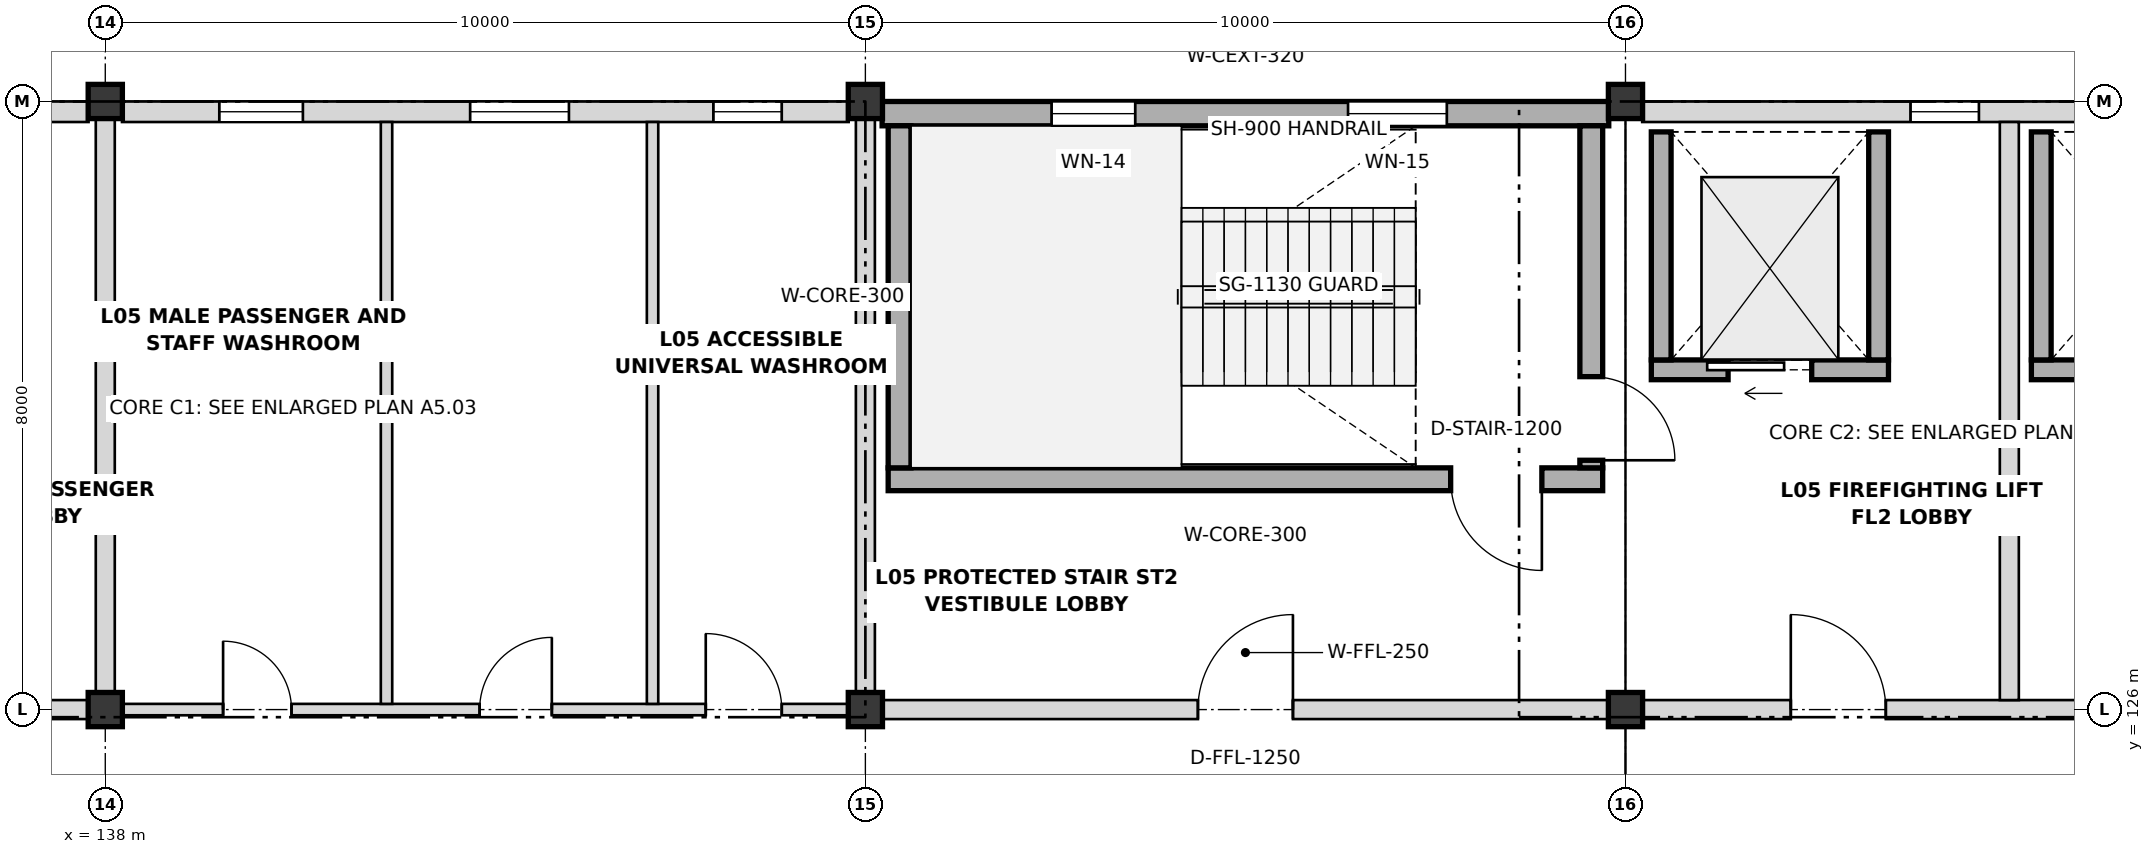
"""IFC4 building model, lengths in metres.
Left out: names, types, materials, properties, quantities, classifications, styles, units other than length and angle.
Written with IfcOpenShell. Run it as: python <this file> out.ifc"""

import sys

from ifc_helpers import new_model, si_unit, direction, frame, frame_2d, origin, origin_2d, place, context, subcontext, project, spatial, rectangle, extrude, element, fill, save


model = new_model("IFC4")
c1 = context("Model", 3, precision=1e-05, world=origin(), true_north=direction((0.0, 1.0)))
c2 = subcontext(c1, "Body", "Model", "MODEL_VIEW")
j1 = project(units=[si_unit("LENGTHUNIT", "METRE"), si_unit("PLANEANGLEUNIT", "RADIAN")], contexts=[c1])
p1 = place(None, origin())
s1 = spatial("IfcSite", under=j1, at=p1, CompositionType="ELEMENT")
p2 = place(p1, origin())
s2 = spatial("IfcBuilding", under=s1, at=p2, CompositionType="ELEMENT")
p3 = place(p2, frame((0.0, 0.0, 22.8)))
s3 = spatial("IfcBuildingStorey", under=s2, at=p3, CompositionType="ELEMENT", Elevation=22.8)
for number, where, z_axis, x_axis in (
    (1, (138.0, 126.0, 0.0), (0.0, 0.0, 1.0), (1.0, 0.0, 0.0)),
    (2, (138.0, 134.0, 0.0), (0.0, 0.0, 1.0), (1.0, 0.0, 0.0)),
    (3, (148.0, 126.0, 0.0), (0.0, 0.0, 1.0), (1.0, 0.0, 0.0)),
    (4, (148.0, 134.0, 0.0), (0.0, 0.0, 1.0), (1.0, 0.0, 0.0)),
    (5, (158.0, 126.0, 0.0), (0.0, 0.0, 1.0), (1.0, 0.0, 0.0)),
    (6, (158.0, 134.0, 0.0), (0.0, 0.0, 1.0), (1.0, 0.0, 0.0)),
):
    element("IfcColumn", number, at=place(p3, frame(where, z_axis=z_axis, x_axis=x_axis)), inside=s3, PredefinedType="COLUMN", context=c2, shape_type="SweptSolid", body=[
        extrude(rectangle(XDim=0.45, YDim=0.45, at=origin_2d()), origin(), (0.0, 0.0, 1.0), 4.2),
    ])
p4 = place(p3, frame((128.22, 133.865, 0.0), z_axis=(0.0, 0.0, 1.0), x_axis=(1.0, 0.0, 0.0)))
e7 = element("IfcWall", 7, at=p4, inside=s3, PredefinedType="SOLIDWALL", context=c2, shape_type="SweptSolid", body=[
    extrude(rectangle(XDim=9.56, YDim=0.27, at=frame_2d((4.78, 0.0))), origin(), (0.0, 0.0, 1.0), 3.188),
])
p5 = place(p4, frame((3.53, 0.0, 1.05)))
e8 = element("IfcOpeningElement", 8, at=p5, cuts=e7, PredefinedType="OPENING", context=c2, shape_type="SweptSolid", body=[
    extrude(rectangle(XDim=0.9, YDim=1.15, at=frame_2d((0.45, 0.575))), frame((0.0, 0.145, 0.0), z_axis=(0.0, -1.0, 0.0), x_axis=(1.0, 0.0, 0.0)), (0.0, 0.0, 1.0), 0.29),
])
p6 = place(p3, frame((138.22, 133.865, 0.0), z_axis=(0.0, 0.0, 1.0), x_axis=(1.0, 0.0, 0.0)))
e9 = element("IfcWall", 9, at=p6, inside=s3, PredefinedType="SOLIDWALL", context=c2, shape_type="SweptSolid", body=[
    extrude(rectangle(XDim=9.56, YDim=0.27, at=frame_2d((4.78, 0.0))), origin(), (0.0, 0.0, 1.0), 3.188),
])
p7 = place(p6, frame((1.28, 0.0, 1.25)))
e10 = element("IfcOpeningElement", 10, at=p7, cuts=e9, PredefinedType="OPENING", context=c2, shape_type="SweptSolid", body=[
    extrude(rectangle(XDim=1.1, YDim=1.15, at=frame_2d((0.55, 0.575))), frame((0.0, 0.145, 0.0), z_axis=(0.0, -1.0, 0.0), x_axis=(1.0, 0.0, 0.0)), (0.0, 0.0, 1.0), 0.29),
])
p8 = place(p6, frame((4.58, 0.0, 1.25)))
e11 = element("IfcOpeningElement", 11, at=p8, cuts=e9, PredefinedType="OPENING", context=c2, shape_type="SweptSolid", body=[
    extrude(rectangle(XDim=1.3, YDim=1.15, at=frame_2d((0.65, 0.575))), frame((0.0, 0.145, 0.0), z_axis=(0.0, -1.0, 0.0), x_axis=(1.0, 0.0, 0.0)), (0.0, 0.0, 1.0), 0.29),
])
p9 = place(p6, frame((7.78, 0.0, 1.25)))
e12 = element("IfcOpeningElement", 12, at=p9, cuts=e9, PredefinedType="OPENING", context=c2, shape_type="SweptSolid", body=[
    extrude(rectangle(XDim=0.9, YDim=1.4, at=frame_2d((0.45, 0.7))), frame((0.0, 0.145, 0.0), z_axis=(0.0, -1.0, 0.0), x_axis=(1.0, 0.0, 0.0)), (0.0, 0.0, 1.0), 0.29),
])
p10 = place(p3, frame((148.22, 133.84, 0.0), z_axis=(0.0, 0.0, 1.0), x_axis=(1.0, 0.0, 0.0)))
e13 = element("IfcWall", 13, at=p10, inside=s3, PredefinedType="SHEAR", context=c2, shape_type="SweptSolid", body=[
    extrude(rectangle(XDim=9.56, YDim=0.32, at=frame_2d((4.78, 0.0))), origin(), (0.0, 0.0, 1.0), 4.2),
])
p11 = place(p10, frame((2.23, 0.0, 1.05)))
e14 = element("IfcOpeningElement", 14, at=p11, cuts=e13, PredefinedType="OPENING", context=c2, shape_type="SweptSolid", body=[
    extrude(rectangle(XDim=1.1, YDim=1.4, at=frame_2d((0.55, 0.7))), frame((0.0, 0.17, 0.0), z_axis=(0.0, -1.0, 0.0), x_axis=(1.0, 0.0, 0.0)), (0.0, 0.0, 1.0), 0.34),
])
p12 = place(p10, frame((6.13, 0.0, 1.05)))
e15 = element("IfcOpeningElement", 15, at=p12, cuts=e13, PredefinedType="OPENING", context=c2, shape_type="SweptSolid", body=[
    extrude(rectangle(XDim=1.3, YDim=1.4, at=frame_2d((0.65, 0.7))), frame((0.0, 0.17, 0.0), z_axis=(0.0, -1.0, 0.0), x_axis=(1.0, 0.0, 0.0)), (0.0, 0.0, 1.0), 0.34),
])
p13 = place(p3, frame((158.22, 133.865, 0.0), z_axis=(0.0, 0.0, 1.0), x_axis=(1.0, 0.0, 0.0)))
e16 = element("IfcWall", 16, at=p13, inside=s3, PredefinedType="SOLIDWALL", context=c2, shape_type="SweptSolid", body=[
    extrude(rectangle(XDim=9.56, YDim=0.27, at=frame_2d((4.78, 0.0))), origin(), (0.0, 0.0, 1.0), 3.188),
])
p14 = place(p13, frame((3.53, 0.0, 1.05)))
e17 = element("IfcOpeningElement", 17, at=p14, cuts=e16, PredefinedType="OPENING", context=c2, shape_type="SweptSolid", body=[
    extrude(rectangle(XDim=0.9, YDim=1.15, at=frame_2d((0.45, 0.575))), frame((0.0, 0.145, 0.0), z_axis=(0.0, -1.0, 0.0), x_axis=(1.0, 0.0, 0.0)), (0.0, 0.0, 1.0), 0.29),
])
p15 = place(p3, frame((157.7, 129.03, 0.0), z_axis=(0.0, 0.0, 1.0), x_axis=(-1.0, 0.0, 0.0)))
e18 = element("IfcWall", 18, at=p15, inside=s3, PredefinedType="SHEAR", context=c2, shape_type="SweptSolid", body=[
    extrude(rectangle(XDim=9.4, YDim=0.3, at=frame_2d((4.7, 0.0))), origin(), (0.0, 0.0, 1.0), 4.2),
])
p16 = place(p15, frame((0.8, 0.0, 0.0)))
e19 = element("IfcOpeningElement", 19, at=p16, cuts=e18, PredefinedType="OPENING", context=c2, shape_type="SweptSolid", body=[
    extrude(rectangle(XDim=1.2, YDim=2.15, at=frame_2d((0.6, 1.075))), frame((0.0, 0.16, 0.0), z_axis=(0.0, -1.0, 0.0), x_axis=(1.0, 0.0, 0.0)), (0.0, 0.0, 1.0), 0.32),
])
p17 = place(p3, frame((157.55, 133.68, 0.0), z_axis=(0.0, 0.0, 1.0), x_axis=(0.0, -1.0, 0.0)))
e20 = element("IfcWall", 20, at=p17, inside=s3, PredefinedType="SHEAR", context=c2, shape_type="SweptSolid", body=[
    extrude(rectangle(XDim=4.5, YDim=0.3, at=frame_2d((2.25, 0.0))), origin(), (0.0, 0.0, 1.0), 4.2),
])
p18 = place(p17, frame((3.3, 0.0, 0.0)))
e21 = element("IfcOpeningElement", 21, at=p18, cuts=e20, PredefinedType="OPENING", context=c2, shape_type="SweptSolid", body=[
    extrude(rectangle(XDim=1.1, YDim=2.15, at=frame_2d((0.55, 1.075))), frame((0.0, 0.16, 0.0), z_axis=(0.0, -1.0, 0.0), x_axis=(1.0, 0.0, 0.0)), (0.0, 0.0, 1.0), 0.32),
])
p19 = place(p3, frame((148.45, 129.18, 0.0), z_axis=(0.0, 0.0, 1.0), x_axis=(0.0, 1.0, 0.0)))
e22 = element("IfcWall", 22, at=p19, inside=s3, PredefinedType="SHEAR", context=c2, shape_type="SweptSolid", body=[
    extrude(rectangle(XDim=4.5, YDim=0.3, at=frame_2d((2.25, 0.0))), origin(), (0.0, 0.0, 1.0), 4.2),
])
p20 = place(p3, frame((158.34, 130.47, 0.0), z_axis=(0.0, 0.0, 1.0), x_axis=(1.0, 0.0, 0.0)))
e23 = element("IfcWall", 23, at=p20, inside=s3, PredefinedType="SHEAR", context=c2, shape_type="SweptSolid", body=[
    extrude(rectangle(XDim=3.12, YDim=0.26, at=frame_2d((1.56, 0.0))), origin(), (0.0, 0.0, 1.0), 4.2),
])
p21 = place(p20, frame((1.01, 0.0, 0.0)))
e24 = element("IfcOpeningElement", 24, at=p21, cuts=e23, PredefinedType="OPENING", context=c2, shape_type="SweptSolid", body=[
    extrude(rectangle(XDim=1.1, YDim=2.1, at=frame_2d((0.55, 1.05))), frame((0.0, 0.14, 0.0), z_axis=(0.0, -1.0, 0.0), x_axis=(1.0, 0.0, 0.0)), (0.0, 0.0, 1.0), 0.28),
])
for number, where, z_axis, x_axis in (
    (25, (158.47, 130.6, 0.0), (0.0, 0.0, 1.0), (0.0, 1.0, 0.0)),
    (26, (161.33, 130.6, 0.0), (0.0, 0.0, 1.0), (0.0, 1.0, 0.0)),
):
    element("IfcWall", number, at=place(p3, frame(where, z_axis=z_axis, x_axis=x_axis)), inside=s3, PredefinedType="SHEAR", context=c2, shape_type="SweptSolid", body=[
        extrude(rectangle(XDim=3.0, YDim=0.26, at=frame_2d((1.5, 0.0))), origin(), (0.0, 0.0, 1.0), 4.2),
    ])
p22 = place(p3, frame((163.34, 130.47, 0.0), z_axis=(0.0, 0.0, 1.0), x_axis=(1.0, 0.0, 0.0)))
e27 = element("IfcWall", 27, at=p22, inside=s3, PredefinedType="SHEAR", context=c2, shape_type="SweptSolid", body=[
    extrude(rectangle(XDim=3.12, YDim=0.26, at=frame_2d((1.56, 0.0))), origin(), (0.0, 0.0, 1.0), 4.2),
])
p23 = place(p22, frame((1.01, 0.0, 0.0)))
e28 = element("IfcOpeningElement", 28, at=p23, cuts=e27, PredefinedType="OPENING", context=c2, shape_type="SweptSolid", body=[
    extrude(rectangle(XDim=1.1, YDim=2.15, at=frame_2d((0.55, 1.075))), frame((0.0, 0.14, 0.0), z_axis=(0.0, -1.0, 0.0), x_axis=(1.0, 0.0, 0.0)), (0.0, 0.0, 1.0), 0.28),
])
p24 = place(p3, frame((163.47, 130.6, 0.0), z_axis=(0.0, 0.0, 1.0), x_axis=(0.0, 1.0, 0.0)))
e29 = element("IfcWall", 29, at=p24, inside=s3, PredefinedType="SHEAR", context=c2, shape_type="SweptSolid", body=[
    extrude(rectangle(XDim=3.0, YDim=0.26, at=frame_2d((1.5, 0.0))), origin(), (0.0, 0.0, 1.0), 4.2),
])
p25 = place(p3, frame((128.23, 126.0, 0.0), z_axis=(0.0, 0.0, 1.0), x_axis=(1.0, 0.0, 0.0)))
e30 = element("IfcWall", 30, at=p25, inside=s3, PredefinedType="PARTITIONING", context=c2, shape_type="SweptSolid", body=[
    extrude(rectangle(XDim=9.54, YDim=0.25, at=frame_2d((4.77, 0.0))), origin(), (0.0, 0.0, 1.0), 3.188),
])
p26 = place(p25, frame((1.945, 0.0, 0.0)))
e31 = element("IfcOpeningElement", 31, at=p26, cuts=e30, PredefinedType="OPENING", context=c2, shape_type="SweptSolid", body=[
    extrude(rectangle(XDim=1.25, YDim=2.15, at=frame_2d((0.625, 1.075))), frame((0.0, 0.135, 0.0), z_axis=(0.0, -1.0, 0.0), x_axis=(1.0, 0.0, 0.0)), (0.0, 0.0, 1.0), 0.27),
])
p27 = place(p25, frame((6.42, 0.0, 0.0)))
e32 = element("IfcOpeningElement", 32, at=p27, cuts=e30, PredefinedType="OPENING", context=c2, shape_type="SweptSolid", body=[
    extrude(rectangle(XDim=1.1, YDim=2.15, at=frame_2d((0.55, 1.075))), frame((0.0, 0.135, 0.0), z_axis=(0.0, -1.0, 0.0), x_axis=(1.0, 0.0, 0.0)), (0.0, 0.0, 1.0), 0.27),
])
p28 = place(p3, frame((138.23, 126.0, 0.0), z_axis=(0.0, 0.0, 1.0), x_axis=(1.0, 0.0, 0.0)))
e33 = element("IfcWall", 33, at=p28, inside=s3, PredefinedType="PARTITIONING", context=c2, shape_type="SweptSolid", body=[
    extrude(rectangle(XDim=9.54, YDim=0.15, at=frame_2d((4.77, 0.0))), origin(), (0.0, 0.0, 1.0), 3.188),
])
p29 = place(p28, frame((1.32, 0.0, 0.0)))
e34 = element("IfcOpeningElement", 34, at=p29, cuts=e33, PredefinedType="OPENING", context=c2, shape_type="SweptSolid", body=[
    extrude(rectangle(XDim=0.9, YDim=2.05, at=frame_2d((0.45, 1.025))), frame((0.0, 0.085, 0.0), z_axis=(0.0, -1.0, 0.0), x_axis=(1.0, 0.0, 0.0)), (0.0, 0.0, 1.0), 0.17),
])
p30 = place(p28, frame((4.695, 0.0, 0.0)))
e35 = element("IfcOpeningElement", 35, at=p30, cuts=e33, PredefinedType="OPENING", context=c2, shape_type="SweptSolid", body=[
    extrude(rectangle(XDim=0.95, YDim=2.05, at=frame_2d((0.475, 1.025))), frame((0.0, 0.085, 0.0), z_axis=(0.0, -1.0, 0.0), x_axis=(1.0, 0.0, 0.0)), (0.0, 0.0, 1.0), 0.17),
])
p31 = place(p28, frame((7.67, 0.0, 0.0)))
e36 = element("IfcOpeningElement", 36, at=p31, cuts=e33, PredefinedType="OPENING", context=c2, shape_type="SweptSolid", body=[
    extrude(rectangle(XDim=1.0, YDim=2.05, at=frame_2d((0.5, 1.025))), frame((0.0, 0.085, 0.0), z_axis=(0.0, -1.0, 0.0), x_axis=(1.0, 0.0, 0.0)), (0.0, 0.0, 1.0), 0.17),
])
p32 = place(p3, frame((148.23, 126.0, 0.0), z_axis=(0.0, 0.0, 1.0), x_axis=(1.0, 0.0, 0.0)))
e37 = element("IfcWall", 37, at=p32, inside=s3, PredefinedType="PARTITIONING", context=c2, shape_type="SweptSolid", body=[
    extrude(rectangle(XDim=9.54, YDim=0.25, at=frame_2d((4.77, 0.0))), origin(), (0.0, 0.0, 1.0), 3.188),
])
p33 = place(p32, frame((4.145, 0.0, 0.0)))
e38 = element("IfcOpeningElement", 38, at=p33, cuts=e37, PredefinedType="OPENING", context=c2, shape_type="SweptSolid", body=[
    extrude(rectangle(XDim=1.25, YDim=2.15, at=frame_2d((0.625, 1.075))), frame((0.0, 0.135, 0.0), z_axis=(0.0, -1.0, 0.0), x_axis=(1.0, 0.0, 0.0)), (0.0, 0.0, 1.0), 0.27),
])
p34 = place(p3, frame((158.23, 126.0, 0.0), z_axis=(0.0, 0.0, 1.0), x_axis=(1.0, 0.0, 0.0)))
e39 = element("IfcWall", 39, at=p34, inside=s3, PredefinedType="PARTITIONING", context=c2, shape_type="SweptSolid", body=[
    extrude(rectangle(XDim=9.54, YDim=0.25, at=frame_2d((4.77, 0.0))), origin(), (0.0, 0.0, 1.0), 3.188),
])
p35 = place(p34, frame((1.945, 0.0, 0.0)))
e40 = element("IfcOpeningElement", 40, at=p35, cuts=e39, PredefinedType="OPENING", context=c2, shape_type="SweptSolid", body=[
    extrude(rectangle(XDim=1.25, YDim=2.15, at=frame_2d((0.625, 1.075))), frame((0.0, 0.135, 0.0), z_axis=(0.0, -1.0, 0.0), x_axis=(1.0, 0.0, 0.0)), (0.0, 0.0, 1.0), 0.27),
])
p36 = place(p34, frame((6.42, 0.0, 0.0)))
e41 = element("IfcOpeningElement", 41, at=p36, cuts=e39, PredefinedType="OPENING", context=c2, shape_type="SweptSolid", body=[
    extrude(rectangle(XDim=1.1, YDim=2.15, at=frame_2d((0.55, 1.075))), frame((0.0, 0.135, 0.0), z_axis=(0.0, -1.0, 0.0), x_axis=(1.0, 0.0, 0.0)), (0.0, 0.0, 1.0), 0.27),
])
p37 = place(p3, frame((163.05, 126.125, 0.0), z_axis=(0.0, 0.0, 1.0), x_axis=(0.0, 1.0, 0.0)))
e42 = element("IfcWall", 42, at=p37, inside=s3, PredefinedType="PARTITIONING", context=c2, shape_type="SweptSolid", body=[
    extrude(rectangle(XDim=7.605, YDim=0.25, at=frame_2d((3.802, 0.0))), origin(), (0.0, 0.0, 1.0), 3.188),
])
for number, where, z_axis, x_axis in (
    (43, (141.7, 126.075, 0.0), (0.0, 0.0, 1.0), (0.0, 1.0, 0.0)),
    (44, (145.2, 126.075, 0.0), (0.0, 0.0, 1.0), (0.0, 1.0, 0.0)),
):
    element("IfcWall", number, at=place(p3, frame(where, z_axis=z_axis, x_axis=x_axis)), inside=s3, PredefinedType="PARTITIONING", context=c2, shape_type="SweptSolid", body=[
        extrude(rectangle(XDim=7.655, YDim=0.15, at=frame_2d((3.828, 0.0))), origin(), (0.0, 0.0, 1.0), 3.188),
    ])
for number, where, z_axis, x_axis in (
    (45, (138.0, 126.23, 0.0), (0.0, 0.0, 1.0), (0.0, 1.0, 0.0)),
    (46, (148.0, 126.23, 0.0), (0.0, 0.0, 1.0), (0.0, 1.0, 0.0)),
):
    element("IfcWall", number, at=place(p3, frame(where, z_axis=z_axis, x_axis=x_axis)), inside=s3, PredefinedType="PARTITIONING", context=c2, shape_type="SweptSolid", body=[
        extrude(rectangle(XDim=7.54, YDim=0.25, at=frame_2d((3.77, 0.0))), origin(), (0.0, 0.0, 1.0), 3.188),
    ])
p38 = place(p7, origin())
e47 = element("IfcWindow", 47, at=p38, inside=s3, PartitioningType="SINGLE_PANEL", PredefinedType="WINDOW", context=c2, shape_type="SweptSolid", body=[
    extrude(rectangle(XDim=1.1, YDim=1.15, at=frame_2d((0.55, 0.575))), frame((0.0, 0.03, 0.0), z_axis=(0.0, -1.0, 0.0), x_axis=(1.0, 0.0, 0.0)), (0.0, 0.0, 1.0), 0.06),
])
fill(e10, e47)
p39 = place(p8, origin())
e48 = element("IfcWindow", 48, at=p39, inside=s3, PartitioningType="SINGLE_PANEL", PredefinedType="WINDOW", context=c2, shape_type="SweptSolid", body=[
    extrude(rectangle(XDim=1.3, YDim=1.15, at=frame_2d((0.65, 0.575))), frame((0.0, 0.03, 0.0), z_axis=(0.0, -1.0, 0.0), x_axis=(1.0, 0.0, 0.0)), (0.0, 0.0, 1.0), 0.06),
])
fill(e11, e48)
p40 = place(p9, origin())
e49 = element("IfcWindow", 49, at=p40, inside=s3, PartitioningType="SINGLE_PANEL", PredefinedType="WINDOW", context=c2, shape_type="SweptSolid", body=[
    extrude(rectangle(XDim=0.9, YDim=1.4, at=frame_2d((0.45, 0.7))), frame((0.0, 0.03, 0.0), z_axis=(0.0, -1.0, 0.0), x_axis=(1.0, 0.0, 0.0)), (0.0, 0.0, 1.0), 0.06),
])
fill(e12, e49)
p41 = place(p11, origin())
e50 = element("IfcWindow", 50, at=p41, inside=s3, PartitioningType="SINGLE_PANEL", PredefinedType="WINDOW", context=c2, shape_type="SweptSolid", body=[
    extrude(rectangle(XDim=1.1, YDim=1.4, at=frame_2d((0.55, 0.7))), frame((0.0, 0.03, 0.0), z_axis=(0.0, -1.0, 0.0), x_axis=(1.0, 0.0, 0.0)), (0.0, 0.0, 1.0), 0.06),
])
fill(e14, e50)
p42 = place(p12, origin())
e51 = element("IfcWindow", 51, at=p42, inside=s3, PartitioningType="SINGLE_PANEL", PredefinedType="WINDOW", context=c2, shape_type="SweptSolid", body=[
    extrude(rectangle(XDim=1.3, YDim=1.4, at=frame_2d((0.65, 0.7))), frame((0.0, 0.03, 0.0), z_axis=(0.0, -1.0, 0.0), x_axis=(1.0, 0.0, 0.0)), (0.0, 0.0, 1.0), 0.06),
])
fill(e15, e51)
p43 = place(p14, origin())
e52 = element("IfcWindow", 52, at=p43, inside=s3, PartitioningType="SINGLE_PANEL", PredefinedType="WINDOW", context=c2, shape_type="SweptSolid", body=[
    extrude(rectangle(XDim=0.9, YDim=1.15, at=frame_2d((0.45, 0.575))), frame((0.0, 0.03, 0.0), z_axis=(0.0, -1.0, 0.0), x_axis=(1.0, 0.0, 0.0)), (0.0, 0.0, 1.0), 0.06),
])
fill(e17, e52)
p44 = place(p16, origin())
e53 = element("IfcDoor", 53, at=p44, inside=s3, OperationType="SINGLE_SWING_LEFT", PredefinedType="DOOR", context=c2, shape_type="SweptSolid", body=[
    extrude(rectangle(XDim=1.2, YDim=2.15, at=frame_2d((0.6, 1.075))), frame((0.0, 0.025, 0.0), z_axis=(0.0, -1.0, 0.0), x_axis=(1.0, 0.0, 0.0)), (0.0, 0.0, 1.0), 0.05),
])
fill(e19, e53)
p45 = place(p18, origin())
e54 = element("IfcDoor", 54, at=p45, inside=s3, OperationType="SINGLE_SWING_RIGHT", PredefinedType="DOOR", context=c2, shape_type="SweptSolid", body=[
    extrude(rectangle(XDim=1.1, YDim=2.15, at=frame_2d((0.55, 1.075))), frame((0.0, 0.025, 0.0), z_axis=(0.0, -1.0, 0.0), x_axis=(1.0, 0.0, 0.0)), (0.0, 0.0, 1.0), 0.05),
])
fill(e21, e54)
p46 = place(p21, origin())
e55 = element("IfcDoor", 55, at=p46, inside=s3, OperationType="SLIDING_TO_LEFT", PredefinedType="DOOR", context=c2, shape_type="SweptSolid", body=[
    extrude(rectangle(XDim=1.1, YDim=2.1, at=frame_2d((0.55, 1.05))), frame((0.0, 0.025, 0.0), z_axis=(0.0, -1.0, 0.0), x_axis=(1.0, 0.0, 0.0)), (0.0, 0.0, 1.0), 0.05),
])
fill(e24, e55)
p47 = place(p29, origin())
e56 = element("IfcDoor", 56, at=p47, inside=s3, OperationType="SINGLE_SWING_LEFT", PredefinedType="DOOR", context=c2, shape_type="SweptSolid", body=[
    extrude(rectangle(XDim=0.9, YDim=2.05, at=frame_2d((0.45, 1.025))), frame((0.0, 0.025, 0.0), z_axis=(0.0, -1.0, 0.0), x_axis=(1.0, 0.0, 0.0)), (0.0, 0.0, 1.0), 0.05),
])
fill(e34, e56)
p48 = place(p30, origin())
e57 = element("IfcDoor", 57, at=p48, inside=s3, OperationType="SINGLE_SWING_RIGHT", PredefinedType="DOOR", context=c2, shape_type="SweptSolid", body=[
    extrude(rectangle(XDim=0.95, YDim=2.05, at=frame_2d((0.475, 1.025))), frame((0.0, 0.025, 0.0), z_axis=(0.0, -1.0, 0.0), x_axis=(1.0, 0.0, 0.0)), (0.0, 0.0, 1.0), 0.05),
])
fill(e35, e57)
p49 = place(p31, origin())
e58 = element("IfcDoor", 58, at=p49, inside=s3, OperationType="SINGLE_SWING_LEFT", PredefinedType="DOOR", context=c2, shape_type="SweptSolid", body=[
    extrude(rectangle(XDim=1.0, YDim=2.05, at=frame_2d((0.5, 1.025))), frame((0.0, 0.025, 0.0), z_axis=(0.0, -1.0, 0.0), x_axis=(1.0, 0.0, 0.0)), (0.0, 0.0, 1.0), 0.05),
])
fill(e36, e58)
p50 = place(p33, origin())
e59 = element("IfcDoor", 59, at=p50, inside=s3, OperationType="SINGLE_SWING_RIGHT", PredefinedType="DOOR", context=c2, shape_type="SweptSolid", body=[
    extrude(rectangle(XDim=1.25, YDim=2.15, at=frame_2d((0.625, 1.075))), frame((0.0, 0.025, 0.0), z_axis=(0.0, -1.0, 0.0), x_axis=(1.0, 0.0, 0.0)), (0.0, 0.0, 1.0), 0.05),
])
fill(e38, e59)
p51 = place(p35, origin())
e60 = element("IfcDoor", 60, at=p51, inside=s3, OperationType="SINGLE_SWING_LEFT", PredefinedType="DOOR", context=c2, shape_type="SweptSolid", body=[
    extrude(rectangle(XDim=1.25, YDim=2.15, at=frame_2d((0.625, 1.075))), frame((0.0, 0.025, 0.0), z_axis=(0.0, -1.0, 0.0), x_axis=(1.0, 0.0, 0.0)), (0.0, 0.0, 1.0), 0.05),
])
fill(e40, e60)
save(model, sys.argv[1])
